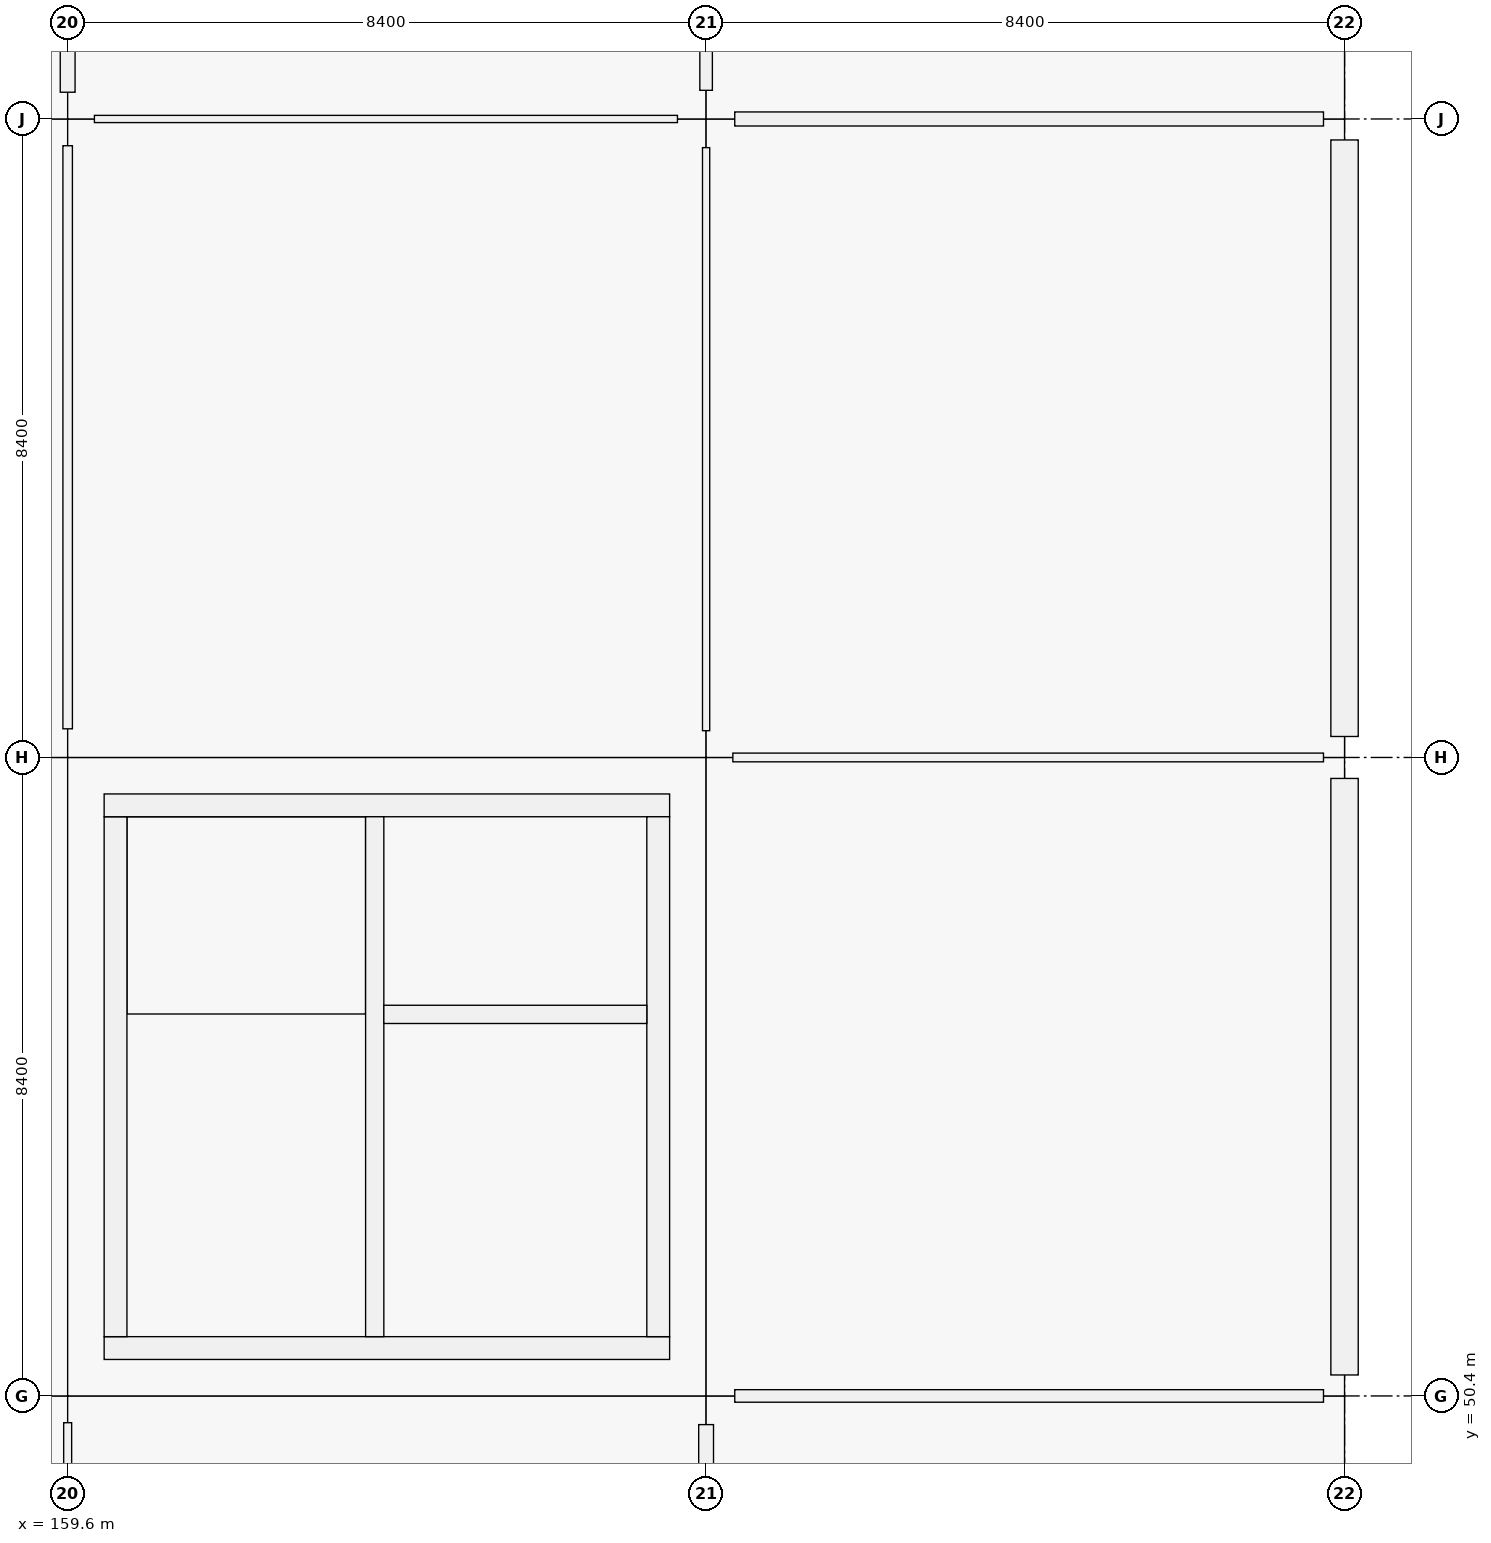
"""IFC4 building model, lengths in metres.
Left out: names, types, materials, properties, quantities, classifications, styles, units other than length and angle.
Written with IfcOpenShell. Run it as: python <this file> out.ifc"""

import sys

from ifc_helpers import new_model, si_unit, direction, frame, frame_2d, origin, origin_2d, place, context, subcontext, project, spatial, rectangle, extrude, element, fill, save


model = new_model("IFC4")
c1 = context("Model", 3, precision=1e-05, world=origin(), true_north=direction((0.0, 1.0)))
c2 = subcontext(c1, "Body", "Model", "MODEL_VIEW")
j1 = project(units=[si_unit("LENGTHUNIT", "METRE"), si_unit("PLANEANGLEUNIT", "RADIAN")], contexts=[c1])
p1 = place(None, origin())
s1 = spatial("IfcSite", under=j1, at=p1, CompositionType="ELEMENT")
p2 = place(p1, origin())
s2 = spatial("IfcBuilding", under=s1, at=p2, CompositionType="ELEMENT")
p3 = place(p2, frame((0.0, 0.0, 5.76)))
s3 = spatial("IfcBuildingStorey", under=s2, at=p3, CompositionType="ELEMENT", Elevation=5.76)
p4 = place(p3, frame((159.6, 50.4, 0.0), z_axis=(0.0, 0.0, 1.0), x_axis=(1.0, 0.0, 0.0)))
e1 = element("IfcColumn", 1, at=p4, inside=s3, PredefinedType="COLUMN", context=c2, shape_type="SweptSolid", body=[
    extrude(rectangle(XDim=0.7, YDim=0.7, at=origin_2d()), origin(), (0.0, 0.0, 1.0), 4.5),
])
p5 = place(p3, frame((159.6, 58.8, 0.0), z_axis=(0.0, 0.0, 1.0), x_axis=(1.0, 0.0, 0.0)))
e2 = element("IfcColumn", 2, at=p5, inside=s3, PredefinedType="COLUMN", context=c2, shape_type="SweptSolid", body=[
    extrude(rectangle(XDim=0.75, YDim=0.75, at=origin_2d()), origin(), (0.0, 0.0, 1.0), 4.5),
])
p6 = place(p3, frame((159.6, 67.2, 0.0), z_axis=(0.0, 0.0, 1.0), x_axis=(1.0, 0.0, 0.0)))
e3 = element("IfcColumn", 3, at=p6, inside=s3, PredefinedType="COLUMN", context=c2, shape_type="SweptSolid", body=[
    extrude(rectangle(XDim=0.7, YDim=0.7, at=origin_2d()), origin(), (0.0, 0.0, 1.0), 4.5),
])
p7 = place(p3, frame((168.0, 50.4, 0.0), z_axis=(0.0, 0.0, 1.0), x_axis=(1.0, 0.0, 0.0)))
e4 = element("IfcColumn", 4, at=p7, inside=s3, PredefinedType="COLUMN", context=c2, shape_type="SweptSolid", body=[
    extrude(rectangle(XDim=0.75, YDim=0.75, at=origin_2d()), origin(), (0.0, 0.0, 1.0), 4.5),
])
p8 = place(p3, frame((168.0, 58.8, 0.0), z_axis=(0.0, 0.0, 1.0), x_axis=(1.0, 0.0, 0.0)))
e5 = element("IfcColumn", 5, at=p8, inside=s3, PredefinedType="COLUMN", context=c2, shape_type="SweptSolid", body=[
    extrude(rectangle(XDim=0.7, YDim=0.7, at=origin_2d()), origin(), (0.0, 0.0, 1.0), 4.5),
])
p9 = place(p3, frame((168.0, 67.2, 0.0), z_axis=(0.0, 0.0, 1.0), x_axis=(1.0, 0.0, 0.0)))
e6 = element("IfcColumn", 6, at=p9, inside=s3, PredefinedType="COLUMN", context=c2, shape_type="SweptSolid", body=[
    extrude(rectangle(XDim=0.75, YDim=0.75, at=origin_2d()), origin(), (0.0, 0.0, 1.0), 4.5),
])
for number, where, z_axis, x_axis in (
    (7, (176.4, 50.4, 0.0), (0.0, 0.0, 1.0), (1.0, 0.0, 0.0)),
    (8, (176.4, 58.8, 0.0), (0.0, 0.0, 1.0), (1.0, 0.0, 0.0)),
    (9, (176.4, 67.2, 0.0), (0.0, 0.0, 1.0), (1.0, 0.0, 0.0)),
):
    element("IfcColumn", number, at=place(p3, frame(where, z_axis=z_axis, x_axis=x_axis)), inside=s3, PredefinedType="COLUMN", context=c2, shape_type="SweptSolid", body=[
        extrude(rectangle(XDim=0.55, YDim=0.55, at=origin_2d()), origin(), (0.0, 0.0, 1.0), 4.2),
    ])
p10 = place(p3, frame((176.4, 58.524, 0.0), z_axis=(0.0, 0.0, 1.0), x_axis=(0.0, -1.0, 0.0)))
e10 = element("IfcWall", 10, at=p10, inside=s3, PredefinedType="SOLIDWALL", context=c2, shape_type="SweptSolid", body=[
    extrude(rectangle(XDim=7.848, YDim=0.36, at=frame_2d((3.924, 0.0))), origin(), (0.0, 0.0, 1.0), 3.4),
])
p11 = place(p10, frame((2.749, 0.0, 0.9)))
e11 = element("IfcOpeningElement", 11, at=p11, cuts=e10, PredefinedType="OPENING", context=c2, shape_type="SweptSolid", body=[
    extrude(rectangle(XDim=2.35, YDim=1.6, at=frame_2d((1.175, 0.8))), frame((0.0, 0.18, 0.0), z_axis=(0.0, -1.0, 0.0), x_axis=(1.0, 0.0, 0.0)), (0.0, 0.0, 1.0), 0.36),
])
p12 = place(p3, frame((176.4, 66.924, 0.0), z_axis=(0.0, 0.0, 1.0), x_axis=(0.0, -1.0, 0.0)))
e12 = element("IfcWall", 12, at=p12, inside=s3, PredefinedType="SOLIDWALL", context=c2, shape_type="SweptSolid", body=[
    extrude(rectangle(XDim=7.848, YDim=0.36, at=frame_2d((3.924, 0.0))), origin(), (0.0, 0.0, 1.0), 3.4),
])
p13 = place(p12, frame((2.549, 0.0, 0.9)))
e13 = element("IfcOpeningElement", 13, at=p13, cuts=e12, PredefinedType="OPENING", context=c2, shape_type="SweptSolid", body=[
    extrude(rectangle(XDim=2.75, YDim=1.6, at=frame_2d((1.375, 0.8))), frame((0.0, 0.18, 0.0), z_axis=(0.0, -1.0, 0.0), x_axis=(1.0, 0.0, 0.0)), (0.0, 0.0, 1.0), 0.36),
])
p14 = place(p3, frame((167.52, 51.03, 0.0), z_axis=(0.0, 0.0, 1.0), x_axis=(-1.0, 0.0, 0.0)))
e14 = element("IfcWall", 14, at=p14, inside=s3, PredefinedType="SHEAR", context=c2, shape_type="SweptSolid", body=[
    extrude(rectangle(XDim=7.44, YDim=0.3, at=frame_2d((3.72, 0.0))), origin(), (0.0, 0.0, 1.0), 4.5),
])
p15 = place(p14, frame((1.28, 0.0, 0.0)))
e15 = element("IfcOpeningElement", 15, at=p15, cuts=e14, PredefinedType="OPENING", context=c2, shape_type="SweptSolid", body=[
    extrude(rectangle(XDim=1.5, YDim=2.15, at=frame_2d((0.75, 1.075))), frame((0.0, 0.15, 0.0), z_axis=(0.0, -1.0, 0.0), x_axis=(1.0, 0.0, 0.0)), (0.0, 0.0, 1.0), 0.3),
])
p16 = place(p3, frame((160.23, 51.18, 0.0), z_axis=(0.0, 0.0, 1.0), x_axis=(0.0, 1.0, 0.0)))
e16 = element("IfcWall", 16, at=p16, inside=s3, PredefinedType="SHEAR", context=c2, shape_type="SweptSolid", body=[
    extrude(rectangle(XDim=6.84, YDim=0.3, at=frame_2d((3.42, 0.0))), origin(), (0.0, 0.0, 1.0), 4.5),
])
p17 = place(p3, frame((160.08, 58.17, 0.0), z_axis=(0.0, 0.0, 1.0), x_axis=(1.0, 0.0, 0.0)))
e17 = element("IfcWall", 17, at=p17, inside=s3, PredefinedType="SHEAR", context=c2, shape_type="SweptSolid", body=[
    extrude(rectangle(XDim=7.44, YDim=0.3, at=frame_2d((3.72, 0.0))), origin(), (0.0, 0.0, 1.0), 4.5),
])
p18 = place(p3, frame((167.37, 58.02, 0.0), z_axis=(0.0, 0.0, 1.0), x_axis=(0.0, -1.0, 0.0)))
e18 = element("IfcWall", 18, at=p18, inside=s3, PredefinedType="SHEAR", context=c2, shape_type="SweptSolid", body=[
    extrude(rectangle(XDim=6.84, YDim=0.3, at=frame_2d((3.42, 0.0))), origin(), (0.0, 0.0, 1.0), 4.5),
])
p19 = place(p3, frame((163.64, 51.18, 0.0), z_axis=(0.0, 0.0, 1.0), x_axis=(0.0, 1.0, 0.0)))
e19 = element("IfcWall", 19, at=p19, inside=s3, PredefinedType="SHEAR", context=c2, shape_type="SweptSolid", body=[
    extrude(rectangle(XDim=6.84, YDim=0.24, at=frame_2d((3.42, 0.0))), origin(), (0.0, 0.0, 1.0), 4.5),
])
p20 = place(p19, frame((0.12, 0.0, 0.0)))
e20 = element("IfcOpeningElement", 20, at=p20, cuts=e19, PredefinedType="OPENING", context=c2, shape_type="SweptSolid", body=[
    extrude(rectangle(XDim=1.0, YDim=2.15, at=frame_2d((0.5, 1.075))), frame((0.0, 0.12, 0.0), z_axis=(0.0, -1.0, 0.0), x_axis=(1.0, 0.0, 0.0)), (0.0, 0.0, 1.0), 0.24),
])
p21 = place(p3, frame((163.76, 55.42, 0.0), z_axis=(0.0, 0.0, 1.0), x_axis=(1.0, 0.0, 0.0)))
e21 = element("IfcWall", 21, at=p21, inside=s3, PredefinedType="SHEAR", context=c2, shape_type="SweptSolid", body=[
    extrude(rectangle(XDim=3.46, YDim=0.24, at=frame_2d((1.73, 0.0))), origin(), (0.0, 0.0, 1.0), 4.5),
])
p22 = place(p21, frame((1.08, 0.0, 0.0)))
e22 = element("IfcOpeningElement", 22, at=p22, cuts=e21, PredefinedType="OPENING", context=c2, shape_type="SweptSolid", body=[
    extrude(rectangle(XDim=1.3, YDim=2.25, at=frame_2d((0.65, 1.125))), frame((0.0, 0.12, 0.0), z_axis=(0.0, -1.0, 0.0), x_axis=(1.0, 0.0, 0.0)), (0.0, 0.0, 1.0), 0.24),
])
p23 = place(p3, frame((159.952, 67.2, 0.0), z_axis=(0.0, 0.0, 1.0), x_axis=(1.0, 0.0, 0.0)))
e23 = element("IfcWall", 23, at=p23, inside=s3, PredefinedType="PARTITIONING", context=c2, shape_type="SweptSolid", body=[
    extrude(rectangle(XDim=7.671, YDim=0.095, at=frame_2d((3.835, 0.0))), origin(), (0.0, 0.0, 1.0), 2.4),
])
p24 = place(p23, frame((3.351, 0.0, 0.0)))
e24 = element("IfcOpeningElement", 24, at=p24, cuts=e23, PredefinedType="OPENING", context=c2, shape_type="SweptSolid", body=[
    extrude(rectangle(XDim=0.97, YDim=2.12, at=frame_2d((0.485, 1.06))), frame((0.0, 0.047, 0.0), z_axis=(0.0, -1.0, 0.0), x_axis=(1.0, 0.0, 0.0)), (0.0, 0.0, 1.0), 0.095),
])
p25 = place(p3, frame((168.377, 50.4, 0.0), z_axis=(0.0, 0.0, 1.0), x_axis=(1.0, 0.0, 0.0)))
e25 = element("IfcWall", 25, at=p25, inside=s3, PredefinedType="PARTITIONING", context=c2, shape_type="SweptSolid", body=[
    extrude(rectangle(XDim=7.746, YDim=0.165, at=frame_2d((3.873, 0.0))), origin(), (0.0, 0.0, 1.0), 2.4),
])
p26 = place(p25, frame((3.363, 0.0, 0.0)))
e26 = element("IfcOpeningElement", 26, at=p26, cuts=e25, PredefinedType="OPENING", context=c2, shape_type="SweptSolid", body=[
    extrude(rectangle(XDim=1.02, YDim=2.2, at=frame_2d((0.51, 1.1))), frame((0.0, 0.083, 0.0), z_axis=(0.0, -1.0, 0.0), x_axis=(1.0, 0.0, 0.0)), (0.0, 0.0, 1.0), 0.165),
])
p27 = place(p3, frame((168.352, 58.8, 0.0), z_axis=(0.0, 0.0, 1.0), x_axis=(1.0, 0.0, 0.0)))
e27 = element("IfcWall", 27, at=p27, inside=s3, PredefinedType="PARTITIONING", context=c2, shape_type="SweptSolid", body=[
    extrude(rectangle(XDim=7.771, YDim=0.115, at=frame_2d((3.885, 0.0))), origin(), (0.0, 0.0, 1.0), 2.4),
])
p28 = place(p27, frame((3.385, 0.0, 0.0)))
e28 = element("IfcOpeningElement", 28, at=p28, cuts=e27, PredefinedType="OPENING", context=c2, shape_type="SweptSolid", body=[
    extrude(rectangle(XDim=1.0, YDim=2.2, at=frame_2d((0.5, 1.1))), frame((0.0, 0.058, 0.0), z_axis=(0.0, -1.0, 0.0), x_axis=(1.0, 0.0, 0.0)), (0.0, 0.0, 1.0), 0.115),
])
p29 = place(p3, frame((168.377, 67.2, 0.0), z_axis=(0.0, 0.0, 1.0), x_axis=(1.0, 0.0, 0.0)))
e29 = element("IfcWall", 29, at=p29, inside=s3, PredefinedType="PARTITIONING", context=c2, shape_type="SweptSolid", body=[
    extrude(rectangle(XDim=7.746, YDim=0.185, at=frame_2d((3.873, 0.0))), origin(), (0.0, 0.0, 1.0), 2.4),
])
p30 = place(p29, frame((3.383, 0.0, 0.0)))
e30 = element("IfcOpeningElement", 30, at=p30, cuts=e29, PredefinedType="OPENING", context=c2, shape_type="SweptSolid", body=[
    extrude(rectangle(XDim=0.98, YDim=2.18, at=frame_2d((0.49, 1.09))), frame((0.0, 0.093, 0.0), z_axis=(0.0, -1.0, 0.0), x_axis=(1.0, 0.0, 0.0)), (0.0, 0.0, 1.0), 0.185),
])
p31 = place(p3, frame((159.6, 42.377, 0.0), z_axis=(0.0, 0.0, 1.0), x_axis=(0.0, 1.0, 0.0)))
e31 = element("IfcWall", 31, at=p31, inside=s3, PredefinedType="PARTITIONING", context=c2, shape_type="SweptSolid", body=[
    extrude(rectangle(XDim=7.671, YDim=0.105, at=frame_2d((3.835, 0.0))), origin(), (0.0, 0.0, 1.0), 2.4),
])
p32 = place(p31, frame((3.311, 0.0, 0.0)))
e32 = element("IfcOpeningElement", 32, at=p32, cuts=e31, PredefinedType="OPENING", context=c2, shape_type="SweptSolid", body=[
    extrude(rectangle(XDim=1.05, YDim=2.12, at=frame_2d((0.525, 1.06))), frame((0.0, 0.052, 0.0), z_axis=(0.0, -1.0, 0.0), x_axis=(1.0, 0.0, 0.0)), (0.0, 0.0, 1.0), 0.105),
])
p33 = place(p3, frame((159.6, 59.177, 0.0), z_axis=(0.0, 0.0, 1.0), x_axis=(0.0, 1.0, 0.0)))
e33 = element("IfcWall", 33, at=p33, inside=s3, PredefinedType="PARTITIONING", context=c2, shape_type="SweptSolid", body=[
    extrude(rectangle(XDim=7.671, YDim=0.125, at=frame_2d((3.835, 0.0))), origin(), (0.0, 0.0, 1.0), 2.4),
])
p34 = place(p33, frame((3.331, 0.0, 0.0)))
e34 = element("IfcOpeningElement", 34, at=p34, cuts=e33, PredefinedType="OPENING", context=c2, shape_type="SweptSolid", body=[
    extrude(rectangle(XDim=1.01, YDim=2.12, at=frame_2d((0.505, 1.06))), frame((0.0, 0.062, 0.0), z_axis=(0.0, -1.0, 0.0), x_axis=(1.0, 0.0, 0.0)), (0.0, 0.0, 1.0), 0.125),
])
p35 = place(p3, frame((159.6, 67.552, 0.0), z_axis=(0.0, 0.0, 1.0), x_axis=(0.0, 1.0, 0.0)))
e35 = element("IfcWall", 35, at=p35, inside=s3, PredefinedType="PARTITIONING", context=c2, shape_type="SweptSolid", body=[
    extrude(rectangle(XDim=7.771, YDim=0.195, at=frame_2d((3.885, 0.0))), origin(), (0.0, 0.0, 1.0), 2.4),
])
p36 = place(p35, frame((3.365, 0.0, 0.0)))
e36 = element("IfcOpeningElement", 36, at=p36, cuts=e35, PredefinedType="OPENING", context=c2, shape_type="SweptSolid", body=[
    extrude(rectangle(XDim=1.04, YDim=2.2, at=frame_2d((0.52, 1.1))), frame((0.0, 0.098, 0.0), z_axis=(0.0, -1.0, 0.0), x_axis=(1.0, 0.0, 0.0)), (0.0, 0.0, 1.0), 0.195),
])
p37 = place(p3, frame((168.0, 42.352, 0.0), z_axis=(0.0, 0.0, 1.0), x_axis=(0.0, 1.0, 0.0)))
e37 = element("IfcWall", 37, at=p37, inside=s3, PredefinedType="PARTITIONING", context=c2, shape_type="SweptSolid", body=[
    extrude(rectangle(XDim=7.671, YDim=0.195, at=frame_2d((3.835, 0.0))), origin(), (0.0, 0.0, 1.0), 2.4),
])
p38 = place(p37, frame((3.371, 0.0, 0.0)))
e38 = element("IfcOpeningElement", 38, at=p38, cuts=e37, PredefinedType="OPENING", context=c2, shape_type="SweptSolid", body=[
    extrude(rectangle(XDim=0.93, YDim=2.12, at=frame_2d((0.465, 1.06))), frame((0.0, 0.098, 0.0), z_axis=(0.0, -1.0, 0.0), x_axis=(1.0, 0.0, 0.0)), (0.0, 0.0, 1.0), 0.195),
])
p39 = place(p3, frame((168.0, 59.152, 0.0), z_axis=(0.0, 0.0, 1.0), x_axis=(0.0, 1.0, 0.0)))
e39 = element("IfcWall", 39, at=p39, inside=s3, PredefinedType="PARTITIONING", context=c2, shape_type="SweptSolid", body=[
    extrude(rectangle(XDim=7.671, YDim=0.095, at=frame_2d((3.835, 0.0))), origin(), (0.0, 0.0, 1.0), 2.4),
])
p40 = place(p39, frame((3.365, 0.0, 0.0)))
e40 = element("IfcOpeningElement", 40, at=p40, cuts=e39, PredefinedType="OPENING", context=c2, shape_type="SweptSolid", body=[
    extrude(rectangle(XDim=0.94, YDim=2.15, at=frame_2d((0.47, 1.075))), frame((0.0, 0.047, 0.0), z_axis=(0.0, -1.0, 0.0), x_axis=(1.0, 0.0, 0.0)), (0.0, 0.0, 1.0), 0.095),
])
p41 = place(p3, frame((168.0, 67.577, 0.0), z_axis=(0.0, 0.0, 1.0), x_axis=(0.0, 1.0, 0.0)))
e41 = element("IfcWall", 41, at=p41, inside=s3, PredefinedType="PARTITIONING", context=c2, shape_type="SweptSolid", body=[
    extrude(rectangle(XDim=7.746, YDim=0.165, at=frame_2d((3.873, 0.0))), origin(), (0.0, 0.0, 1.0), 2.4),
])
p42 = place(p41, frame((3.413, 0.0, 0.0)))
e42 = element("IfcOpeningElement", 42, at=p42, cuts=e41, PredefinedType="OPENING", context=c2, shape_type="SweptSolid", body=[
    extrude(rectangle(XDim=0.92, YDim=2.15, at=frame_2d((0.46, 1.075))), frame((0.0, 0.083, 0.0), z_axis=(0.0, -1.0, 0.0), x_axis=(1.0, 0.0, 0.0)), (0.0, 0.0, 1.0), 0.165),
])
p43 = place(p11, origin())
e43 = element("IfcWindow", 43, at=p43, inside=s3, PartitioningType="SINGLE_PANEL", PredefinedType="WINDOW", context=c2, shape_type="SweptSolid", body=[
    extrude(rectangle(XDim=2.35, YDim=1.6, at=frame_2d((1.175, 0.8))), frame((0.0, 0.03, 0.0), z_axis=(0.0, -1.0, 0.0), x_axis=(1.0, 0.0, 0.0)), (0.0, 0.0, 1.0), 0.06),
])
fill(e11, e43)
p44 = place(p13, origin())
e44 = element("IfcWindow", 44, at=p44, inside=s3, PartitioningType="SINGLE_PANEL", PredefinedType="WINDOW", context=c2, shape_type="SweptSolid", body=[
    extrude(rectangle(XDim=2.75, YDim=1.6, at=frame_2d((1.375, 0.8))), frame((0.0, 0.03, 0.0), z_axis=(0.0, -1.0, 0.0), x_axis=(1.0, 0.0, 0.0)), (0.0, 0.0, 1.0), 0.06),
])
fill(e13, e44)
p45 = place(p20, origin())
e45 = element("IfcDoor", 45, at=p45, inside=s3, OperationType="SINGLE_SWING_LEFT", PredefinedType="DOOR", context=c2, shape_type="SweptSolid", body=[
    extrude(rectangle(XDim=1.0, YDim=2.15, at=frame_2d((0.5, 1.075))), frame((0.0, 0.025, 0.0), z_axis=(0.0, -1.0, 0.0), x_axis=(1.0, 0.0, 0.0)), (0.0, 0.0, 1.0), 0.05),
])
fill(e20, e45)
p46 = place(p15, origin())
e46 = element("IfcDoor", 46, at=p46, inside=s3, OperationType="DOUBLE_DOOR_SINGLE_SWING", PredefinedType="DOOR", context=c2, shape_type="SweptSolid", body=[
    extrude(rectangle(XDim=1.5, YDim=2.15, at=frame_2d((0.75, 1.075))), frame((0.0, 0.025, 0.0), z_axis=(0.0, -1.0, 0.0), x_axis=(1.0, 0.0, 0.0)), (0.0, 0.0, 1.0), 0.05),
])
fill(e15, e46)
p47 = place(p22, origin())
e47 = element("IfcDoor", 47, at=p47, inside=s3, OperationType="DOUBLE_DOOR_SLIDING", PredefinedType="DOOR", context=c2, shape_type="SweptSolid", body=[
    extrude(rectangle(XDim=1.3, YDim=2.25, at=frame_2d((0.65, 1.125))), frame((0.0, 0.025, 0.0), z_axis=(0.0, -1.0, 0.0), x_axis=(1.0, 0.0, 0.0)), (0.0, 0.0, 1.0), 0.05),
])
fill(e22, e47)
p48 = place(p24, origin())
e48 = element("IfcDoor", 48, at=p48, inside=s3, OperationType="SINGLE_SWING_LEFT", PredefinedType="DOOR", context=c2, shape_type="SweptSolid", body=[
    extrude(rectangle(XDim=0.97, YDim=2.12, at=frame_2d((0.485, 1.06))), frame((0.0, 0.025, 0.0), z_axis=(0.0, -1.0, 0.0), x_axis=(1.0, 0.0, 0.0)), (0.0, 0.0, 1.0), 0.05),
])
fill(e24, e48)
p49 = place(p26, origin())
e49 = element("IfcDoor", 49, at=p49, inside=s3, OperationType="SINGLE_SWING_RIGHT", PredefinedType="DOOR", context=c2, shape_type="SweptSolid", body=[
    extrude(rectangle(XDim=1.02, YDim=2.2, at=frame_2d((0.51, 1.1))), frame((0.0, 0.025, 0.0), z_axis=(0.0, -1.0, 0.0), x_axis=(1.0, 0.0, 0.0)), (0.0, 0.0, 1.0), 0.05),
])
fill(e26, e49)
p50 = place(p28, origin())
e50 = element("IfcDoor", 50, at=p50, inside=s3, OperationType="SINGLE_SWING_LEFT", PredefinedType="DOOR", context=c2, shape_type="SweptSolid", body=[
    extrude(rectangle(XDim=1.0, YDim=2.2, at=frame_2d((0.5, 1.1))), frame((0.0, 0.025, 0.0), z_axis=(0.0, -1.0, 0.0), x_axis=(1.0, 0.0, 0.0)), (0.0, 0.0, 1.0), 0.05),
])
fill(e28, e50)
p51 = place(p30, origin())
e51 = element("IfcDoor", 51, at=p51, inside=s3, OperationType="SINGLE_SWING_RIGHT", PredefinedType="DOOR", context=c2, shape_type="SweptSolid", body=[
    extrude(rectangle(XDim=0.98, YDim=2.18, at=frame_2d((0.49, 1.09))), frame((0.0, 0.025, 0.0), z_axis=(0.0, -1.0, 0.0), x_axis=(1.0, 0.0, 0.0)), (0.0, 0.0, 1.0), 0.05),
])
fill(e30, e51)
p52 = place(p34, origin())
e52 = element("IfcDoor", 52, at=p52, inside=s3, OperationType="SINGLE_SWING_RIGHT", PredefinedType="DOOR", context=c2, shape_type="SweptSolid", body=[
    extrude(rectangle(XDim=1.01, YDim=2.12, at=frame_2d((0.505, 1.06))), frame((0.0, 0.025, 0.0), z_axis=(0.0, -1.0, 0.0), x_axis=(1.0, 0.0, 0.0)), (0.0, 0.0, 1.0), 0.05),
])
fill(e34, e52)
p53 = place(p40, origin())
e53 = element("IfcDoor", 53, at=p53, inside=s3, OperationType="SINGLE_SWING_RIGHT", PredefinedType="DOOR", context=c2, shape_type="SweptSolid", body=[
    extrude(rectangle(XDim=0.94, YDim=2.15, at=frame_2d((0.47, 1.075))), frame((0.0, 0.025, 0.0), z_axis=(0.0, -1.0, 0.0), x_axis=(1.0, 0.0, 0.0)), (0.0, 0.0, 1.0), 0.05),
])
fill(e40, e53)
save(model, sys.argv[1])
